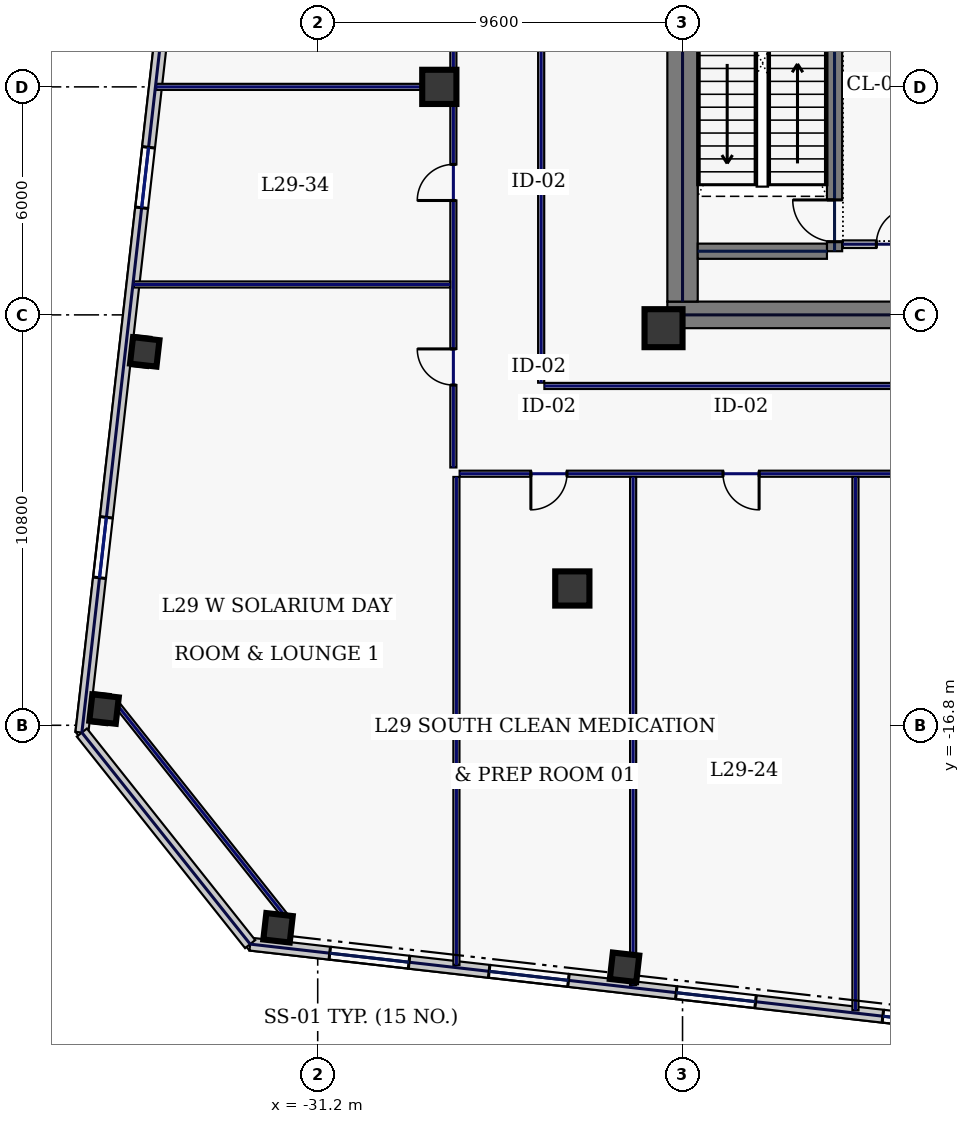
"""IFC4 building model, lengths in metres.
Left out: names, types, materials, properties, quantities, classifications, styles, units other than length and angle.
Written with IfcOpenShell. Run it as: python <this file> out.ifc"""

import sys

from ifc_helpers import new_model, si_unit, direction, frame, frame_2d, origin, origin_2d, place, context, subcontext, project, spatial, rectangle, hollow_rectangle, extrude, element, fill, save


model = new_model("IFC4")
c1 = context("Model", 3, precision=1e-05, world=origin(), true_north=direction((0.0, 1.0)))
c2 = subcontext(c1, "Body", "Model", "MODEL_VIEW")
j1 = project(units=[si_unit("LENGTHUNIT", "METRE"), si_unit("PLANEANGLEUNIT", "RADIAN")], contexts=[c1])
p1 = place(None, origin())
s1 = spatial("IfcSite", under=j1, at=p1, CompositionType="ELEMENT")
p2 = place(p1, origin())
s2 = spatial("IfcBuilding", under=s1, at=p2, CompositionType="ELEMENT")
p3 = place(p2, frame((0.0, 0.0, 129.4)))
s3 = spatial("IfcBuildingStorey", under=s2, at=p3, CompositionType="ELEMENT", Elevation=129.4)
p4 = place(p3, frame((-22.0, -6.0, 0.0), z_axis=(0.0, 0.0, 1.0), x_axis=(1.0, 0.0, 0.0)))
e1 = element("IfcWall", 1, at=p4, inside=s3, PredefinedType="SHEAR", context=c2, shape_type="SweptSolid", body=[
    extrude(rectangle(XDim=11.55, YDim=0.7, at=frame_2d((5.775, 0.0))), origin(), (0.0, 0.0, 1.0), 3.74),
])
p5 = place(p3, frame((-21.6, -5.65, 0.0), z_axis=(0.0, 0.0, 1.0), x_axis=(0.0, 1.0, 0.0)))
e2 = element("IfcWall", 2, at=p5, inside=s3, PredefinedType="SHEAR", context=c2, shape_type="SweptSolid", body=[
    extrude(rectangle(XDim=11.3, YDim=0.8, at=frame_2d((5.65, 0.0))), origin(), (0.0, 0.0, 1.0), 3.74),
])
p6 = place(p3, frame((-17.6, -4.325, 0.0), z_axis=(0.0, 0.0, 1.0), x_axis=(0.0, 1.0, 0.0)))
e3 = element("IfcWall", 3, at=p6, inside=s3, PredefinedType="SHEAR", context=c2, shape_type="SweptSolid", body=[
    extrude(rectangle(XDim=8.65, YDim=0.4, at=frame_2d((4.325, 0.0))), origin(), (0.0, 0.0, 1.0), 3.74),
])
p7 = place(p6, frame((0.25, 0.0, 0.0)))
e4 = element("IfcOpeningElement", 4, at=p7, cuts=e3, PredefinedType="OPENING", context=c2, shape_type="SweptSolid", body=[
    extrude(rectangle(XDim=1.1, YDim=2.2, at=frame_2d((0.55, 1.1))), frame((0.0, 0.21, 0.0), z_axis=(0.0, -1.0, 0.0), x_axis=(1.0, 0.0, 0.0)), (0.0, 0.0, 1.0), 0.42),
])
p8 = place(p3, frame((-21.2, -4.325, 0.0), z_axis=(0.0, 0.0, 1.0), x_axis=(1.0, 0.0, 0.0)))
e5 = element("IfcWall", 5, at=p8, inside=s3, PredefinedType="SHEAR", context=c2, shape_type="SweptSolid", body=[
    extrude(rectangle(XDim=3.4, YDim=0.4, at=frame_2d((1.7, 0.0))), origin(), (0.0, 0.0, 1.0), 3.74),
])
p9 = place(p3, frame((-22.1, -6.35, 0.0), z_axis=(0.0, 0.0, 1.0), x_axis=(1.0, 0.0, 0.0)))
e6 = element("IfcColumn", 6, at=p9, inside=s3, PredefinedType="COLUMN", context=c2, shape_type="SweptSolid", body=[
    extrude(hollow_rectangle(XDim=1.0, YDim=1.0, WallThickness=0.045, at=origin_2d()), origin(), (0.0, 0.0, 1.0), 3.74),
])
for number, where, z_axis, x_axis in (
    (7, (-24.5, -13.2, 0.0), (0.0, 0.0, 1.0), (1.0, 0.0, 0.0)),
    (8, (-28.0, 0.0, 0.0), (0.0, 0.0, 1.0), (1.0, 0.0, 0.0)),
):
    element("IfcColumn", number, at=place(p3, frame(where, z_axis=z_axis, x_axis=x_axis)), inside=s3, PredefinedType="COLUMN", context=c2, shape_type="SweptSolid", body=[
        extrude(hollow_rectangle(XDim=0.9, YDim=0.9, WallThickness=0.04, at=origin_2d()), origin(), (0.0, 0.0, 1.0), 3.74),
    ])
for number, where, z_axis, x_axis in (
    (9, (-32.244, -22.129, 0.0), (0.0, 0.0, 1.0), (0.994, -0.113, 0.0)),
    (10, (-23.126, -23.168, 0.0), (0.0, 0.0, 1.0), (0.994, -0.113, 0.0)),
    (11, (-35.751, -6.974, 0.0), (0.0, 0.0, 1.0), (0.994, -0.113, 0.0)),
    (12, (-36.822, -16.374, 0.0), (0.0, 0.0, 1.0), (0.994, -0.113, 0.0)),
):
    element("IfcColumn", number, at=place(p3, frame(where, z_axis=z_axis, x_axis=x_axis)), inside=s3, PredefinedType="COLUMN", context=c2, shape_type="SweptSolid", body=[
        extrude(hollow_rectangle(XDim=0.7, YDim=0.7, WallThickness=0.032, at=origin_2d()), origin(), (0.0, 0.0, 1.0), 3.74),
    ])
p10 = place(p3, frame((-32.977, -22.559, 0.0), z_axis=(0.0, 0.0, 1.0), x_axis=(0.993571214605, -0.113208840243, 0.0)))
e13 = element("IfcWall", 13, at=p10, inside=s3, PredefinedType="STANDARD", context=c2, shape_type="SweptSolid", body=[
    extrude(rectangle(XDim=21.223, YDim=0.34, at=frame_2d((10.611, 0.0))), origin(), (0.0, 0.0, 1.0), 3.74),
])
p11 = place(p10, frame((2.108, 0.0, 0.67)))
e14 = element("IfcOpeningElement", 14, at=p11, cuts=e13, PredefinedType="OPENING", context=c2, shape_type="SweptSolid", body=[
    extrude(rectangle(XDim=2.1, YDim=2.2, at=frame_2d((1.05, 1.1))), frame((0.0, 0.18, 0.0), z_axis=(0.0, -1.0, 0.0), x_axis=(1.0, 0.0, 0.0)), (0.0, 0.0, 1.0), 0.36),
])
p12 = place(p10, frame((6.329, 0.0, 0.67)))
e15 = element("IfcOpeningElement", 15, at=p12, cuts=e13, PredefinedType="OPENING", context=c2, shape_type="SweptSolid", body=[
    extrude(rectangle(XDim=2.1, YDim=2.2, at=frame_2d((1.05, 1.1))), frame((0.0, 0.18, 0.0), z_axis=(0.0, -1.0, 0.0), x_axis=(1.0, 0.0, 0.0)), (0.0, 0.0, 1.0), 0.36),
])
p13 = place(p10, frame((11.285, 0.0, 0.67)))
e16 = element("IfcOpeningElement", 16, at=p13, cuts=e13, PredefinedType="OPENING", context=c2, shape_type="SweptSolid", body=[
    extrude(rectangle(XDim=2.1, YDim=2.2, at=frame_2d((1.05, 1.1))), frame((0.0, 0.18, 0.0), z_axis=(0.0, -1.0, 0.0), x_axis=(1.0, 0.0, 0.0)), (0.0, 0.0, 1.0), 0.36),
])
p14 = place(p10, frame((16.756, 0.0, 0.67)))
e17 = element("IfcOpeningElement", 17, at=p14, cuts=e13, PredefinedType="OPENING", context=c2, shape_type="SweptSolid", body=[
    extrude(rectangle(XDim=0.85, YDim=1.85, at=frame_2d((0.425, 0.925))), frame((0.0, 0.18, 0.0), z_axis=(0.0, -1.0, 0.0), x_axis=(1.0, 0.0, 0.0)), (0.0, 0.0, 1.0), 0.36),
])
p15 = place(p3, frame((-32.968, 21.957, 0.0), z_axis=(0.0, 0.0, 1.0), x_axis=(-0.113201605824, -0.993572038877, 0.0)))
e18 = element("IfcWall", 18, at=p15, inside=s3, PredefinedType="STANDARD", context=c2, shape_type="SweptSolid", body=[
    extrude(rectangle(XDim=39.2, YDim=0.34, at=frame_2d((19.6, 0.0))), origin(), (0.0, 0.0, 1.0), 3.74),
])
p16 = place(p15, frame((4.1, 0.0, 0.58)))
e19 = element("IfcOpeningElement", 19, at=p16, cuts=e18, PredefinedType="OPENING", context=c2, shape_type="SweptSolid", body=[
    extrude(rectangle(XDim=1.6, YDim=2.3, at=frame_2d((0.8, 1.15))), frame((0.0, 0.18, 0.0), z_axis=(0.0, -1.0, 0.0), x_axis=(1.0, 0.0, 0.0)), (0.0, 0.0, 1.0), 0.36),
])
p17 = place(p15, frame((13.9, 0.0, 0.58)))
e20 = element("IfcOpeningElement", 20, at=p17, cuts=e18, PredefinedType="OPENING", context=c2, shape_type="SweptSolid", body=[
    extrude(rectangle(XDim=1.6, YDim=2.3, at=frame_2d((0.8, 1.15))), frame((0.0, 0.18, 0.0), z_axis=(0.0, -1.0, 0.0), x_axis=(1.0, 0.0, 0.0)), (0.0, 0.0, 1.0), 0.36),
])
p18 = place(p15, frame((23.7, 0.0, 0.58)))
e21 = element("IfcOpeningElement", 21, at=p18, cuts=e18, PredefinedType="OPENING", context=c2, shape_type="SweptSolid", body=[
    extrude(rectangle(XDim=1.6, YDim=2.3, at=frame_2d((0.8, 1.15))), frame((0.0, 0.18, 0.0), z_axis=(0.0, -1.0, 0.0), x_axis=(1.0, 0.0, 0.0)), (0.0, 0.0, 1.0), 0.36),
])
p19 = place(p15, frame((33.5, 0.0, 0.58)))
e22 = element("IfcOpeningElement", 22, at=p19, cuts=e18, PredefinedType="OPENING", context=c2, shape_type="SweptSolid", body=[
    extrude(rectangle(XDim=1.6, YDim=2.3, at=frame_2d((0.8, 1.15))), frame((0.0, 0.18, 0.0), z_axis=(0.0, -1.0, 0.0), x_axis=(1.0, 0.0, 0.0)), (0.0, 0.0, 1.0), 0.36),
])
p20 = place(p3, frame((-37.406, -16.991, 0.0), z_axis=(0.0, 0.0, 1.0), x_axis=(0.622507800567, -0.78261359446, 0.0)))
e23 = element("IfcWall", 23, at=p20, inside=s3, PredefinedType="STANDARD", context=c2, shape_type="SweptSolid", body=[
    extrude(rectangle(XDim=7.114, YDim=0.34, at=frame_2d((3.557, 0.0))), origin(), (0.0, 0.0, 1.0), 3.74),
])
p21 = place(p3, frame((-17.38, -4.14, 0.0), z_axis=(0.0, 0.0, 1.0), x_axis=(1.0, 0.0, 0.0)))
e24 = element("IfcWall", 24, at=p21, inside=s3, PredefinedType="SOLIDWALL", context=c2, shape_type="SweptSolid", body=[
    extrude(rectangle(XDim=2.66, YDim=0.2, at=frame_2d((1.33, 0.0))), origin(), (0.0, 0.0, 1.0), 3.74),
])
p22 = place(p21, frame((0.88, 0.0, 0.0)))
e25 = element("IfcOpeningElement", 25, at=p22, cuts=e24, PredefinedType="OPENING", context=c2, shape_type="SweptSolid", body=[
    extrude(rectangle(XDim=0.95, YDim=2.2, at=frame_2d((0.475, 1.1))), frame((0.0, 0.11, 0.0), z_axis=(0.0, -1.0, 0.0), x_axis=(1.0, 0.0, 0.0)), (0.0, 0.0, 1.0), 0.22),
])
p23 = place(p3, frame((-36.556, -16.162, 0.0), z_axis=(0.0, 0.0, 1.0), x_axis=(0.622522641622, -0.782601789334, 0.0)))
e26 = element("IfcWall", 26, at=p23, inside=s3, PredefinedType="PARTITIONING", context=c2, shape_type="SweptSolid", body=[
    extrude(rectangle(XDim=7.354, YDim=0.16, at=frame_2d((3.677, 0.0))), origin(), (0.0, 0.0, 1.0), 3.74),
])
p24 = place(p3, frame((-27.63, -10.015, 0.0), z_axis=(0.0, 0.0, 1.0), x_axis=(0.0, 1.0, 0.0)))
e27 = element("IfcWall", 27, at=p24, inside=s3, PredefinedType="PARTITIONING", context=c2, shape_type="SweptSolid", body=[
    extrude(rectangle(XDim=20.13, YDim=0.16, at=frame_2d((10.065, 0.0))), origin(), (0.0, 0.0, 1.0), 3.74),
])
p25 = place(p24, frame((2.169, 0.0, 0.0)))
e28 = element("IfcOpeningElement", 28, at=p25, cuts=e27, PredefinedType="OPENING", context=c2, shape_type="SweptSolid", body=[
    extrude(rectangle(XDim=0.95, YDim=2.2, at=frame_2d((0.475, 1.1))), frame((0.0, 0.09, 0.0), z_axis=(0.0, -1.0, 0.0), x_axis=(1.0, 0.0, 0.0)), (0.0, 0.0, 1.0), 0.18),
])
p26 = place(p24, frame((7.025, 0.0, 0.0)))
e29 = element("IfcOpeningElement", 29, at=p26, cuts=e27, PredefinedType="OPENING", context=c2, shape_type="SweptSolid", body=[
    extrude(rectangle(XDim=0.95, YDim=2.2, at=frame_2d((0.475, 1.1))), frame((0.0, 0.09, 0.0), z_axis=(0.0, -1.0, 0.0), x_axis=(1.0, 0.0, 0.0)), (0.0, 0.0, 1.0), 0.18),
])
p27 = place(p24, frame((12.225, 0.0, 0.0)))
e30 = element("IfcOpeningElement", 30, at=p27, cuts=e27, PredefinedType="OPENING", context=c2, shape_type="SweptSolid", body=[
    extrude(rectangle(XDim=0.95, YDim=2.2, at=frame_2d((0.475, 1.1))), frame((0.0, 0.09, 0.0), z_axis=(0.0, -1.0, 0.0), x_axis=(1.0, 0.0, 0.0)), (0.0, 0.0, 1.0), 0.18),
])
p28 = place(p24, frame((17.131, 0.0, 0.0)))
e31 = element("IfcOpeningElement", 31, at=p28, cuts=e27, PredefinedType="OPENING", context=c2, shape_type="SweptSolid", body=[
    extrude(rectangle(XDim=0.95, YDim=2.2, at=frame_2d((0.475, 1.1))), frame((0.0, 0.09, 0.0), z_axis=(0.0, -1.0, 0.0), x_axis=(1.0, 0.0, 0.0)), (0.0, 0.0, 1.0), 0.18),
])
p29 = place(p3, frame((27.465, -10.18, 0.0), z_axis=(0.0, 0.0, 1.0), x_axis=(-1.0, 0.0, 0.0)))
e32 = element("IfcWall", 32, at=p29, inside=s3, PredefinedType="PARTITIONING", context=c2, shape_type="SweptSolid", body=[
    extrude(rectangle(XDim=54.93, YDim=0.16, at=frame_2d((27.465, 0.0))), origin(), (0.0, 0.0, 1.0), 3.74),
])
p30 = place(p29, frame((52.106, 0.0, 0.0)))
e33 = element("IfcOpeningElement", 33, at=p30, cuts=e32, PredefinedType="OPENING", context=c2, shape_type="SweptSolid", body=[
    extrude(rectangle(XDim=0.95, YDim=2.2, at=frame_2d((0.475, 1.1))), frame((0.0, 0.09, 0.0), z_axis=(0.0, -1.0, 0.0), x_axis=(1.0, 0.0, 0.0)), (0.0, 0.0, 1.0), 0.18),
])
p31 = place(p29, frame((47.05, 0.0, 0.0)))
e34 = element("IfcOpeningElement", 34, at=p31, cuts=e32, PredefinedType="OPENING", context=c2, shape_type="SweptSolid", body=[
    extrude(rectangle(XDim=0.95, YDim=2.2, at=frame_2d((0.475, 1.1))), frame((0.0, 0.09, 0.0), z_axis=(0.0, -1.0, 0.0), x_axis=(1.0, 0.0, 0.0)), (0.0, 0.0, 1.0), 0.18),
])
p32 = place(p29, frame((41.65, 0.0, 0.0)))
e35 = element("IfcOpeningElement", 35, at=p32, cuts=e32, PredefinedType="OPENING", context=c2, shape_type="SweptSolid", body=[
    extrude(rectangle(XDim=0.95, YDim=2.2, at=frame_2d((0.475, 1.1))), frame((0.0, 0.09, 0.0), z_axis=(0.0, -1.0, 0.0), x_axis=(1.0, 0.0, 0.0)), (0.0, 0.0, 1.0), 0.18),
])
p33 = place(p29, frame((35.825, 0.0, 0.0)))
e36 = element("IfcOpeningElement", 36, at=p33, cuts=e32, PredefinedType="OPENING", context=c2, shape_type="SweptSolid", body=[
    extrude(rectangle(XDim=0.95, YDim=2.2, at=frame_2d((0.475, 1.1))), frame((0.0, 0.09, 0.0), z_axis=(0.0, -1.0, 0.0), x_axis=(1.0, 0.0, 0.0)), (0.0, 0.0, 1.0), 0.18),
])
p34 = place(p29, frame((29.575, 0.0, 0.0)))
e37 = element("IfcOpeningElement", 37, at=p34, cuts=e32, PredefinedType="OPENING", context=c2, shape_type="SweptSolid", body=[
    extrude(rectangle(XDim=0.95, YDim=2.2, at=frame_2d((0.475, 1.1))), frame((0.0, 0.09, 0.0), z_axis=(0.0, -1.0, 0.0), x_axis=(1.0, 0.0, 0.0)), (0.0, 0.0, 1.0), 0.18),
])
p35 = place(p29, frame((23.285, 0.0, 0.0)))
e38 = element("IfcOpeningElement", 38, at=p35, cuts=e32, PredefinedType="OPENING", context=c2, shape_type="SweptSolid", body=[
    extrude(rectangle(XDim=0.95, YDim=2.2, at=frame_2d((0.475, 1.1))), frame((0.0, 0.09, 0.0), z_axis=(0.0, -1.0, 0.0), x_axis=(1.0, 0.0, 0.0)), (0.0, 0.0, 1.0), 0.18),
])
p36 = place(p29, frame((16.78, 0.0, 0.0)))
e39 = element("IfcOpeningElement", 39, at=p36, cuts=e32, PredefinedType="OPENING", context=c2, shape_type="SweptSolid", body=[
    extrude(rectangle(XDim=1.3, YDim=2.2, at=frame_2d((0.65, 1.1))), frame((0.0, 0.09, 0.0), z_axis=(0.0, -1.0, 0.0), x_axis=(1.0, 0.0, 0.0)), (0.0, 0.0, 1.0), 0.18),
])
p37 = place(p29, frame((11.23, 0.0, 0.0)))
e40 = element("IfcOpeningElement", 40, at=p37, cuts=e32, PredefinedType="OPENING", context=c2, shape_type="SweptSolid", body=[
    extrude(rectangle(XDim=1.3, YDim=2.2, at=frame_2d((0.65, 1.1))), frame((0.0, 0.09, 0.0), z_axis=(0.0, -1.0, 0.0), x_axis=(1.0, 0.0, 0.0)), (0.0, 0.0, 1.0), 0.18),
])
p38 = place(p29, frame((6.46, 0.0, 0.0)))
e41 = element("IfcOpeningElement", 41, at=p38, cuts=e32, PredefinedType="OPENING", context=c2, shape_type="SweptSolid", body=[
    extrude(rectangle(XDim=1.3, YDim=2.2, at=frame_2d((0.65, 1.1))), frame((0.0, 0.09, 0.0), z_axis=(0.0, -1.0, 0.0), x_axis=(1.0, 0.0, 0.0)), (0.0, 0.0, 1.0), 0.18),
])
p39 = place(p29, frame((2.194, 0.0, 0.0)))
e42 = element("IfcOpeningElement", 42, at=p39, cuts=e32, PredefinedType="OPENING", context=c2, shape_type="SweptSolid", body=[
    extrude(rectangle(XDim=0.95, YDim=2.2, at=frame_2d((0.475, 1.1))), frame((0.0, 0.09, 0.0), z_axis=(0.0, -1.0, 0.0), x_axis=(1.0, 0.0, 0.0)), (0.0, 0.0, 1.0), 0.18),
])
p40 = place(p3, frame((-25.32, 7.885, 0.0), z_axis=(0.0, 0.0, 1.0), x_axis=(0.0, -1.0, 0.0)))
e43 = element("IfcWall", 43, at=p40, inside=s3, PredefinedType="PARTITIONING", context=c2, shape_type="SweptSolid", body=[
    extrude(rectangle(XDim=15.67, YDim=0.16, at=frame_2d((7.835, 0.0))), origin(), (0.0, 0.0, 1.0), 3.74),
])
p41 = place(p3, frame((-25.235, -7.87, 0.0), z_axis=(0.0, 0.0, 1.0), x_axis=(1.0, 0.0, 0.0)))
e44 = element("IfcWall", 44, at=p41, inside=s3, PredefinedType="PARTITIONING", context=c2, shape_type="SweptSolid", body=[
    extrude(rectangle(XDim=14.57, YDim=0.16, at=frame_2d((7.285, 0.0))), origin(), (0.0, 0.0, 1.0), 3.74),
])
p42 = place(p3, frame((-27.55, -23.106, 0.0), z_axis=(0.0, 0.0, 1.0), x_axis=(0.0, 1.0, 0.0)))
e45 = element("IfcWall", 45, at=p42, inside=s3, PredefinedType="PARTITIONING", context=c2, shape_type="SweptSolid", body=[
    extrude(rectangle(XDim=12.842, YDim=0.16, at=frame_2d((6.421, 0.0))), origin(), (0.0, 0.0, 1.0), 3.74),
])
p43 = place(p3, frame((-22.9, -23.636, 0.0), z_axis=(0.0, 0.0, 1.0), x_axis=(0.0, 1.0, 0.0)))
e46 = element("IfcWall", 46, at=p43, inside=s3, PredefinedType="PARTITIONING", context=c2, shape_type="SweptSolid", body=[
    extrude(rectangle(XDim=13.371, YDim=0.16, at=frame_2d((6.686, 0.0))), origin(), (0.0, 0.0, 1.0), 3.74),
])
p44 = place(p3, frame((-17.05, -24.303, 0.0), z_axis=(0.0, 0.0, 1.0), x_axis=(0.0, 1.0, 0.0)))
e47 = element("IfcWall", 47, at=p44, inside=s3, PredefinedType="PARTITIONING", context=c2, shape_type="SweptSolid", body=[
    extrude(rectangle(XDim=14.038, YDim=0.16, at=frame_2d((7.019, 0.0))), origin(), (0.0, 0.0, 1.0), 3.74),
])
p45 = place(p3, frame((-36.042, -5.2, 0.0), z_axis=(0.0, 0.0, 1.0), x_axis=(1.0, 0.0, 0.0)))
e48 = element("IfcWall", 48, at=p45, inside=s3, PredefinedType="PARTITIONING", context=c2, shape_type="SweptSolid", body=[
    extrude(rectangle(XDim=8.327, YDim=0.16, at=frame_2d((4.164, 0.0))), origin(), (0.0, 0.0, 1.0), 3.74),
])
p46 = place(p3, frame((-35.449, 0.0, 0.0), z_axis=(0.0, 0.0, 1.0), x_axis=(1.0, 0.0, 0.0)))
e49 = element("IfcWall", 49, at=p46, inside=s3, PredefinedType="PARTITIONING", context=c2, shape_type="SweptSolid", body=[
    extrude(rectangle(XDim=7.734, YDim=0.16, at=frame_2d((3.867, 0.0))), origin(), (0.0, 0.0, 1.0), 3.74),
])
p47 = place(p11, origin())
e50 = element("IfcWindow", 50, at=p47, inside=s3, PartitioningType="SINGLE_PANEL", PredefinedType="WINDOW", context=c2, shape_type="SweptSolid", body=[
    extrude(rectangle(XDim=2.1, YDim=2.2, at=frame_2d((1.05, 1.1))), frame((0.0, 0.03, 0.0), z_axis=(0.0, -1.0, 0.0), x_axis=(1.0, 0.0, 0.0)), (0.0, 0.0, 1.0), 0.06),
])
fill(e14, e50)
p48 = place(p12, origin())
e51 = element("IfcWindow", 51, at=p48, inside=s3, PartitioningType="SINGLE_PANEL", PredefinedType="WINDOW", context=c2, shape_type="SweptSolid", body=[
    extrude(rectangle(XDim=2.1, YDim=2.2, at=frame_2d((1.05, 1.1))), frame((0.0, 0.03, 0.0), z_axis=(0.0, -1.0, 0.0), x_axis=(1.0, 0.0, 0.0)), (0.0, 0.0, 1.0), 0.06),
])
fill(e15, e51)
p49 = place(p13, origin())
e52 = element("IfcWindow", 52, at=p49, inside=s3, PartitioningType="SINGLE_PANEL", PredefinedType="WINDOW", context=c2, shape_type="SweptSolid", body=[
    extrude(rectangle(XDim=2.1, YDim=2.2, at=frame_2d((1.05, 1.1))), frame((0.0, 0.03, 0.0), z_axis=(0.0, -1.0, 0.0), x_axis=(1.0, 0.0, 0.0)), (0.0, 0.0, 1.0), 0.06),
])
fill(e16, e52)
p50 = place(p14, origin())
e53 = element("IfcWindow", 53, at=p50, inside=s3, PartitioningType="SINGLE_PANEL", PredefinedType="WINDOW", context=c2, shape_type="SweptSolid", body=[
    extrude(rectangle(XDim=0.85, YDim=1.85, at=frame_2d((0.425, 0.925))), frame((0.0, 0.03, 0.0), z_axis=(0.0, -1.0, 0.0), x_axis=(1.0, 0.0, 0.0)), (0.0, 0.0, 1.0), 0.06),
])
fill(e17, e53)
p51 = place(p18, origin())
e54 = element("IfcWindow", 54, at=p51, inside=s3, PartitioningType="SINGLE_PANEL", PredefinedType="WINDOW", context=c2, shape_type="SweptSolid", body=[
    extrude(rectangle(XDim=1.6, YDim=2.3, at=frame_2d((0.8, 1.15))), frame((0.0, 0.03, 0.0), z_axis=(0.0, -1.0, 0.0), x_axis=(1.0, 0.0, 0.0)), (0.0, 0.0, 1.0), 0.06),
])
fill(e21, e54)
p52 = place(p19, origin())
e55 = element("IfcWindow", 55, at=p52, inside=s3, PartitioningType="SINGLE_PANEL", PredefinedType="WINDOW", context=c2, shape_type="SweptSolid", body=[
    extrude(rectangle(XDim=1.6, YDim=2.3, at=frame_2d((0.8, 1.15))), frame((0.0, 0.03, 0.0), z_axis=(0.0, -1.0, 0.0), x_axis=(1.0, 0.0, 0.0)), (0.0, 0.0, 1.0), 0.06),
])
fill(e22, e55)
p53 = place(p7, origin())
e56 = element("IfcDoor", 56, at=p53, inside=s3, OperationType="SINGLE_SWING_RIGHT", PredefinedType="DOOR", context=c2, shape_type="SweptSolid", body=[
    extrude(rectangle(XDim=1.1, YDim=2.2, at=frame_2d((0.55, 1.1))), frame((0.0, 0.025, 0.0), z_axis=(0.0, -1.0, 0.0), x_axis=(1.0, 0.0, 0.0)), (0.0, 0.0, 1.0), 0.05),
])
fill(e4, e56)
p54 = place(p22, origin())
e57 = element("IfcDoor", 57, at=p54, inside=s3, OperationType="SINGLE_SWING_RIGHT", PredefinedType="DOOR", context=c2, shape_type="SweptSolid", body=[
    extrude(rectangle(XDim=0.95, YDim=2.2, at=frame_2d((0.475, 1.1))), frame((0.0, 0.025, 0.0), z_axis=(0.0, -1.0, 0.0), x_axis=(1.0, 0.0, 0.0)), (0.0, 0.0, 1.0), 0.05),
])
fill(e25, e57)
p55 = place(p30, origin())
e58 = element("IfcDoor", 58, at=p55, inside=s3, OperationType="SINGLE_SWING_RIGHT", PredefinedType="DOOR", context=c2, shape_type="SweptSolid", body=[
    extrude(rectangle(XDim=0.95, YDim=2.2, at=frame_2d((0.475, 1.1))), frame((0.0, 0.025, 0.0), z_axis=(0.0, -1.0, 0.0), x_axis=(1.0, 0.0, 0.0)), (0.0, 0.0, 1.0), 0.05),
])
fill(e33, e58)
p56 = place(p31, origin())
e59 = element("IfcDoor", 59, at=p56, inside=s3, OperationType="SINGLE_SWING_LEFT", PredefinedType="DOOR", context=c2, shape_type="SweptSolid", body=[
    extrude(rectangle(XDim=0.95, YDim=2.2, at=frame_2d((0.475, 1.1))), frame((0.0, 0.025, 0.0), z_axis=(0.0, -1.0, 0.0), x_axis=(1.0, 0.0, 0.0)), (0.0, 0.0, 1.0), 0.05),
])
fill(e34, e59)
p57 = place(p25, origin())
e60 = element("IfcDoor", 60, at=p57, inside=s3, OperationType="SINGLE_SWING_RIGHT", PredefinedType="DOOR", context=c2, shape_type="SweptSolid", body=[
    extrude(rectangle(XDim=0.95, YDim=2.2, at=frame_2d((0.475, 1.1))), frame((0.0, 0.025, 0.0), z_axis=(0.0, -1.0, 0.0), x_axis=(1.0, 0.0, 0.0)), (0.0, 0.0, 1.0), 0.05),
])
fill(e28, e60)
p58 = place(p26, origin())
e61 = element("IfcDoor", 61, at=p58, inside=s3, OperationType="SINGLE_SWING_LEFT", PredefinedType="DOOR", context=c2, shape_type="SweptSolid", body=[
    extrude(rectangle(XDim=0.95, YDim=2.2, at=frame_2d((0.475, 1.1))), frame((0.0, 0.025, 0.0), z_axis=(0.0, -1.0, 0.0), x_axis=(1.0, 0.0, 0.0)), (0.0, 0.0, 1.0), 0.05),
])
fill(e29, e61)
save(model, sys.argv[1])
